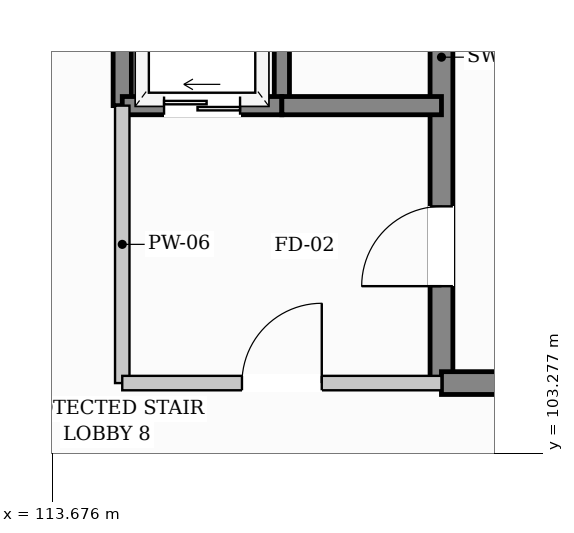
"""IFC4 building model, lengths in metres.
Left out: names, types, materials, properties, quantities, classifications, styles, units other than length and angle.
Written with IfcOpenShell. Run it as: python <this file> out.ifc"""

import sys

from ifc_helpers import new_model, si_unit, direction, frame, frame_2d, origin, place, context, subcontext, project, spatial, rectangle, extrude, element, fill, save


model = new_model("IFC4")
c1 = context("Model", 3, precision=1e-05, world=origin(), true_north=direction((0.0, 1.0)))
c2 = subcontext(c1, "Body", "Model", "MODEL_VIEW")
j1 = project(units=[si_unit("LENGTHUNIT", "METRE"), si_unit("PLANEANGLEUNIT", "RADIAN")], contexts=[c1])
p1 = place(None, origin())
s1 = spatial("IfcSite", under=j1, at=p1, CompositionType="ELEMENT")
p2 = place(p1, origin())
s2 = spatial("IfcBuilding", under=s1, at=p2, CompositionType="ELEMENT")
p3 = place(p2, frame((0.0, 0.0, 5.1)))
s3 = spatial("IfcBuildingStorey", under=s2, at=p3, CompositionType="ELEMENT", Elevation=5.1)
p4 = place(p3, frame((118.8, 104.2, 0.0), z_axis=(0.0, 0.0, 1.0), x_axis=(0.0, 1.0, 0.0)))
e1 = element("IfcWall", 1, at=p4, inside=s3, PredefinedType="SHEAR", context=c2, shape_type="SweptSolid", body=[
    extrude(rectangle(XDim=6.0, YDim=0.3, at=frame_2d((3.0, 0.0))), origin(), (0.0, 0.0, 1.0), 4.22),
])
p5 = place(p4, frame((1.275, 0.0, 0.0)))
e2 = element("IfcOpeningElement", 2, at=p5, cuts=e1, PredefinedType="OPENING", context=c2, shape_type="SweptSolid", body=[
    extrude(rectangle(XDim=1.05, YDim=2.15, at=frame_2d((0.525, 1.075))), frame((0.0, 0.16, 0.0), z_axis=(0.0, -1.0, 0.0), x_axis=(1.0, 0.0, 0.0)), (0.0, 0.0, 1.0), 0.32),
])
p6 = place(p3, frame((118.8, 104.2, 0.0), z_axis=(0.0, 0.0, 1.0), x_axis=(1.0, 0.0, 0.0)))
e3 = element("IfcWall", 3, at=p6, inside=s3, PredefinedType="SHEAR", context=c2, shape_type="SweptSolid", body=[
    extrude(rectangle(XDim=7.0, YDim=0.3, at=frame_2d((3.5, 0.0))), origin(), (0.0, 0.0, 1.0), 4.22),
])
p7 = place(p3, frame((114.6, 107.85, 0.0), z_axis=(0.0, 0.0, 1.0), x_axis=(0.0, 1.0, 0.0)))
e4 = element("IfcWall", 4, at=p7, inside=s3, PredefinedType="SHEAR", context=c2, shape_type="SweptSolid", body=[
    extrude(rectangle(XDim=2.35, YDim=0.24, at=frame_2d((1.175, 0.0))), origin(), (0.0, 0.0, 1.0), 4.22),
])
p8 = place(p3, frame((116.7, 107.85, 0.0), z_axis=(0.0, 0.0, 1.0), x_axis=(0.0, 1.0, 0.0)))
e5 = element("IfcWall", 5, at=p8, inside=s3, PredefinedType="SHEAR", context=c2, shape_type="SweptSolid", body=[
    extrude(rectangle(XDim=2.35, YDim=0.2, at=frame_2d((1.175, 0.0))), origin(), (0.0, 0.0, 1.0), 4.22),
])
p9 = place(p3, frame((114.6, 107.85, 0.0), z_axis=(0.0, 0.0, 1.0), x_axis=(1.0, 0.0, 0.0)))
e6 = element("IfcWall", 6, at=p9, inside=s3, PredefinedType="SHEAR", context=c2, shape_type="SweptSolid", body=[
    extrude(rectangle(XDim=2.1, YDim=0.24, at=frame_2d((1.05, 0.0))), origin(), (0.0, 0.0, 1.0), 4.22),
])
p10 = place(p9, frame((0.55, 0.0, 0.0)))
e7 = element("IfcOpeningElement", 7, at=p10, cuts=e6, PredefinedType="OPENING", context=c2, shape_type="SweptSolid", body=[
    extrude(rectangle(XDim=1.0, YDim=2.1, at=frame_2d((0.5, 1.05))), frame((0.0, 0.13, 0.0), z_axis=(0.0, -1.0, 0.0), x_axis=(1.0, 0.0, 0.0)), (0.0, 0.0, 1.0), 0.26),
])
p11 = place(p3, frame((116.7, 107.85, 0.0), z_axis=(0.0, 0.0, 1.0), x_axis=(1.0, 0.0, 0.0)))
e8 = element("IfcWall", 8, at=p11, inside=s3, PredefinedType="SHEAR", context=c2, shape_type="SweptSolid", body=[
    extrude(rectangle(XDim=2.1, YDim=0.24, at=frame_2d((1.05, 0.0))), origin(), (0.0, 0.0, 1.0), 4.22),
])
p12 = place(p3, frame((114.6, 104.2, 0.0), z_axis=(0.0, 0.0, 1.0), x_axis=(0.0, 1.0, 0.0)))
e9 = element("IfcWall", 9, at=p12, inside=s3, PredefinedType="PARTITIONING", context=c2, shape_type="SweptSolid", body=[
    extrude(rectangle(XDim=3.65, YDim=0.19, at=frame_2d((1.825, 0.0))), origin(), (0.0, 0.0, 1.0), 4.22),
])
p13 = place(p3, frame((114.6, 104.2, 0.0), z_axis=(0.0, 0.0, 1.0), x_axis=(1.0, 0.0, 0.0)))
e10 = element("IfcWall", 10, at=p13, inside=s3, PredefinedType="PARTITIONING", context=c2, shape_type="SweptSolid", body=[
    extrude(rectangle(XDim=4.2, YDim=0.19, at=frame_2d((2.1, 0.0))), origin(), (0.0, 0.0, 1.0), 4.22),
])
p14 = place(p13, frame((1.575, 0.0, 0.0)))
e11 = element("IfcOpeningElement", 11, at=p14, cuts=e10, PredefinedType="OPENING", context=c2, shape_type="SweptSolid", body=[
    extrude(rectangle(XDim=1.05, YDim=2.15, at=frame_2d((0.525, 1.075))), frame((0.0, 0.105, 0.0), z_axis=(0.0, -1.0, 0.0), x_axis=(1.0, 0.0, 0.0)), (0.0, 0.0, 1.0), 0.21),
])
p15 = place(p5, origin())
e12 = element("IfcDoor", 12, at=p15, inside=s3, OperationType="SINGLE_SWING_LEFT", PredefinedType="DOOR", context=c2, shape_type="SweptSolid", body=[
    extrude(rectangle(XDim=1.05, YDim=2.15, at=frame_2d((0.525, 1.075))), frame((0.0, 0.025, 0.0), z_axis=(0.0, -1.0, 0.0), x_axis=(1.0, 0.0, 0.0)), (0.0, 0.0, 1.0), 0.05),
])
fill(e2, e12)
p16 = place(p10, origin())
e13 = element("IfcDoor", 13, at=p16, inside=s3, OperationType="SLIDING_TO_LEFT", PredefinedType="DOOR", context=c2, shape_type="SweptSolid", body=[
    extrude(rectangle(XDim=1.0, YDim=2.1, at=frame_2d((0.5, 1.05))), frame((0.0, 0.025, 0.0), z_axis=(0.0, -1.0, 0.0), x_axis=(1.0, 0.0, 0.0)), (0.0, 0.0, 1.0), 0.05),
])
fill(e7, e13)
p17 = place(p14, origin())
e14 = element("IfcDoor", 14, at=p17, inside=s3, OperationType="SINGLE_SWING_RIGHT", PredefinedType="DOOR", context=c2, shape_type="SweptSolid", body=[
    extrude(rectangle(XDim=1.05, YDim=2.15, at=frame_2d((0.525, 1.075))), frame((0.0, 0.025, 0.0), z_axis=(0.0, -1.0, 0.0), x_axis=(1.0, 0.0, 0.0)), (0.0, 0.0, 1.0), 0.05),
])
fill(e11, e14)
save(model, sys.argv[1])
